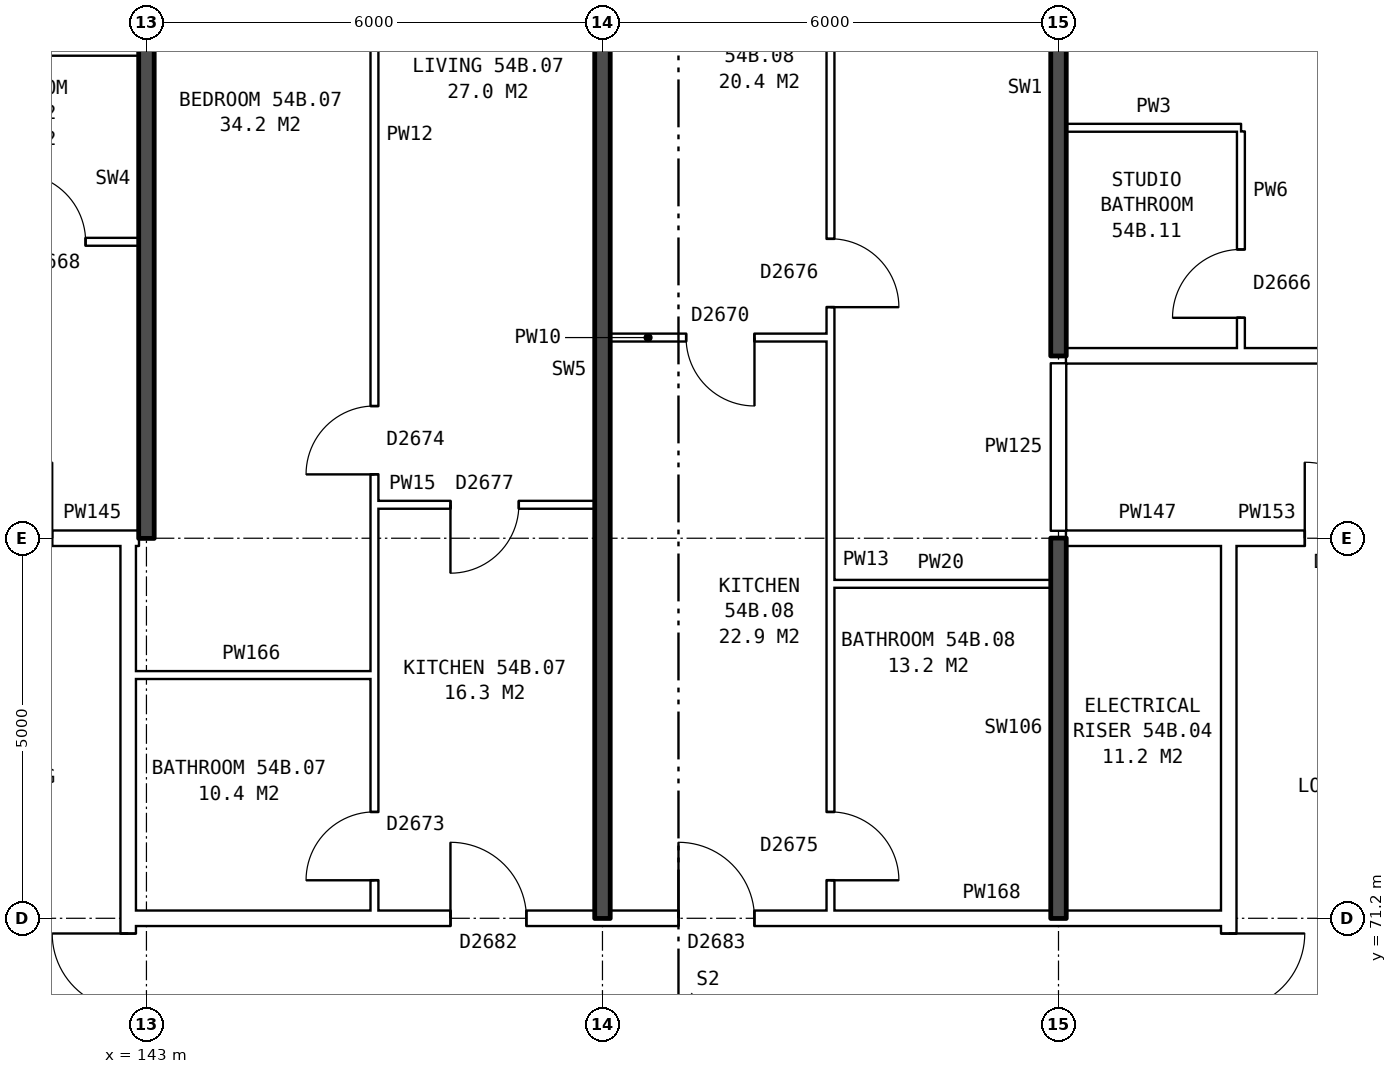
"""IFC4 building model, lengths in metres.
Left out: names, types, materials, properties, quantities, classifications, styles, units other than length and angle.
Written with IfcOpenShell. Run it as: python <this file> out.ifc"""

import sys

from ifc_helpers import new_model, si_unit, direction, frame, frame_2d, origin, place, context, subcontext, project, spatial, rectangle, extrude, element, fill, save


model = new_model("IFC4")
c1 = context("Model", 3, precision=1e-05, world=origin(), true_north=direction((0.0, 1.0)))
c2 = subcontext(c1, "Body", "Model", "MODEL_VIEW")
j1 = project(units=[si_unit("LENGTHUNIT", "METRE"), si_unit("PLANEANGLEUNIT", "RADIAN")], contexts=[c1])
p1 = place(None, origin())
s1 = spatial("IfcSite", under=j1, at=p1, CompositionType="ELEMENT")
p2 = place(p1, origin())
s2 = spatial("IfcBuilding", under=s1, at=p2, CompositionType="ELEMENT")
p3 = place(p2, frame((0.0, 0.0, 191.3)))
s3 = spatial("IfcBuildingStorey", under=s2, at=p3, CompositionType="ELEMENT", Elevation=191.3)
p4 = place(p3, frame((142.76, 63.9, 0.0), z_axis=(0.0, 0.0, 1.0), x_axis=(0.0, 1.0, 0.0)))
e1 = element("IfcWall", 1, at=p4, inside=s3, PredefinedType="PARTITIONING", context=c2, shape_type="SweptSolid", body=[
    extrude(rectangle(XDim=12.2, YDim=0.2, at=frame_2d((6.1, 0.0))), origin(), (0.0, 0.0, 1.0), 2.85),
])
p5 = place(p4, frame((5.1, 0.0, 0.0)))
e2 = element("IfcOpeningElement", 2, at=p5, cuts=e1, PredefinedType="OPENING", context=c2, shape_type="SweptSolid", body=[
    extrude(rectangle(XDim=2.0, YDim=2.1, at=frame_2d((1.0, 1.05))), frame((0.0, 0.11, 0.0), z_axis=(0.0, -1.0, 0.0), x_axis=(1.0, 0.0, 0.0)), (0.0, 0.0, 1.0), 0.22),
])
p6 = place(p3, frame((157.24, 63.9, 0.0), z_axis=(0.0, 0.0, 1.0), x_axis=(0.0, 1.0, 0.0)))
e3 = element("IfcWall", 3, at=p6, inside=s3, PredefinedType="PARTITIONING", context=c2, shape_type="SweptSolid", body=[
    extrude(rectangle(XDim=12.2, YDim=0.2, at=frame_2d((6.1, 0.0))), origin(), (0.0, 0.0, 1.0), 2.85),
])
p7 = place(p6, frame((5.1, 0.0, 0.0)))
e4 = element("IfcOpeningElement", 4, at=p7, cuts=e3, PredefinedType="OPENING", context=c2, shape_type="SweptSolid", body=[
    extrude(rectangle(XDim=2.0, YDim=2.1, at=frame_2d((1.0, 1.05))), frame((0.0, 0.11, 0.0), z_axis=(0.0, -1.0, 0.0), x_axis=(1.0, 0.0, 0.0)), (0.0, 0.0, 1.0), 0.22),
])
p8 = place(p3, frame((142.76, 71.2, 0.0), z_axis=(0.0, 0.0, 1.0), x_axis=(1.0, 0.0, 0.0)))
e5 = element("IfcWall", 5, at=p8, inside=s3, PredefinedType="PARTITIONING", context=c2, shape_type="SweptSolid", body=[
    extrude(rectangle(XDim=14.48, YDim=0.2, at=frame_2d((7.24, 0.0))), origin(), (0.0, 0.0, 1.0), 2.85),
])
p9 = place(p8, frame((4.24, 0.0, 0.0)))
e6 = element("IfcOpeningElement", 6, at=p9, cuts=e5, PredefinedType="OPENING", context=c2, shape_type="SweptSolid", body=[
    extrude(rectangle(XDim=1.0, YDim=2.1, at=frame_2d((0.5, 1.05))), frame((0.0, 0.11, 0.0), z_axis=(0.0, -1.0, 0.0), x_axis=(1.0, 0.0, 0.0)), (0.0, 0.0, 1.0), 0.22),
])
p10 = place(p8, frame((7.24, 0.0, 0.0)))
e7 = element("IfcOpeningElement", 7, at=p10, cuts=e5, PredefinedType="OPENING", context=c2, shape_type="SweptSolid", body=[
    extrude(rectangle(XDim=1.0, YDim=2.1, at=frame_2d((0.5, 1.05))), frame((0.0, 0.11, 0.0), z_axis=(0.0, -1.0, 0.0), x_axis=(1.0, 0.0, 0.0)), (0.0, 0.0, 1.0), 0.22),
])
p11 = place(p3, frame((142.76, 74.4, 0.0), z_axis=(0.0, 0.0, 1.0), x_axis=(1.0, 0.0, 0.0)))
e8 = element("IfcWall", 8, at=p11, inside=s3, PredefinedType="PARTITIONING", context=c2, shape_type="SweptSolid", body=[
    extrude(rectangle(XDim=3.24, YDim=0.1, at=frame_2d((1.62, 0.0))), origin(), (0.0, 0.0, 1.0), 2.85),
])
p12 = place(p3, frame((152.0, 75.6, 0.0), z_axis=(0.0, 0.0, 1.0), x_axis=(1.0, 0.0, 0.0)))
e9 = element("IfcWall", 9, at=p12, inside=s3, PredefinedType="PARTITIONING", context=c2, shape_type="SweptSolid", body=[
    extrude(rectangle(XDim=2.9, YDim=0.1, at=frame_2d((1.45, 0.0))), origin(), (0.0, 0.0, 1.0), 2.85),
])
p13 = place(p3, frame((139.76, 76.2, 0.0), z_axis=(0.0, 0.0, 1.0), x_axis=(1.0, 0.0, 0.0)))
e10 = element("IfcWall", 10, at=p13, inside=s3, PredefinedType="PARTITIONING", context=c2, shape_type="SweptSolid", body=[
    extrude(rectangle(XDim=3.0, YDim=0.2, at=frame_2d((1.5, 0.0))), origin(), (0.0, 0.0, 1.0), 2.85),
])
p14 = place(p13, frame((1.0, 0.0, 0.0)))
e11 = element("IfcOpeningElement", 11, at=p14, cuts=e10, PredefinedType="OPENING", context=c2, shape_type="SweptSolid", body=[
    extrude(rectangle(XDim=1.0, YDim=2.1, at=frame_2d((0.5, 1.05))), frame((0.0, 0.11, 0.0), z_axis=(0.0, -1.0, 0.0), x_axis=(1.0, 0.0, 0.0)), (0.0, 0.0, 1.0), 0.22),
])
p15 = place(p3, frame((142.76, 76.2, 0.0), z_axis=(0.0, 0.0, 1.0), x_axis=(1.0, 0.0, 0.0)))
e12 = element("IfcWall", 12, at=p15, inside=s3, PredefinedType="PARTITIONING", context=c2, shape_type="SweptSolid", body=[
    extrude(rectangle(XDim=0.14, YDim=0.2, at=frame_2d((0.07, 0.0))), origin(), (0.0, 0.0, 1.0), 2.85),
])
p16 = place(p3, frame((155.1, 76.2, 0.0), z_axis=(0.0, 0.0, 1.0), x_axis=(1.0, 0.0, 0.0)))
e13 = element("IfcWall", 13, at=p16, inside=s3, PredefinedType="PARTITIONING", context=c2, shape_type="SweptSolid", body=[
    extrude(rectangle(XDim=2.14, YDim=0.2, at=frame_2d((1.07, 0.0))), origin(), (0.0, 0.0, 1.0), 2.85),
])
p17 = place(p3, frame((157.24, 76.2, 0.0), z_axis=(0.0, 0.0, 1.0), x_axis=(1.0, 0.0, 0.0)))
e14 = element("IfcWall", 14, at=p17, inside=s3, PredefinedType="PARTITIONING", context=c2, shape_type="SweptSolid", body=[
    extrude(rectangle(XDim=3.0, YDim=0.2, at=frame_2d((1.5, 0.0))), origin(), (0.0, 0.0, 1.0), 2.85),
])
p18 = place(p17, frame((1.0, 0.0, 0.0)))
e15 = element("IfcOpeningElement", 15, at=p18, cuts=e14, PredefinedType="OPENING", context=c2, shape_type="SweptSolid", body=[
    extrude(rectangle(XDim=1.0, YDim=2.1, at=frame_2d((0.5, 1.05))), frame((0.0, 0.11, 0.0), z_axis=(0.0, -1.0, 0.0), x_axis=(1.0, 0.0, 0.0)), (0.0, 0.0, 1.0), 0.22),
])
p19 = place(p3, frame((146.0, 76.64, 0.0), z_axis=(0.0, 0.0, 1.0), x_axis=(1.0, 0.0, 0.0)))
e16 = element("IfcWall", 16, at=p19, inside=s3, PredefinedType="PARTITIONING", context=c2, shape_type="SweptSolid", body=[
    extrude(rectangle(XDim=2.9, YDim=0.1, at=frame_2d((1.45, 0.0))), origin(), (0.0, 0.0, 1.0), 2.85),
])
p20 = place(p19, frame((1.0, 0.0, 0.0)))
e17 = element("IfcOpeningElement", 17, at=p20, cuts=e16, PredefinedType="OPENING", context=c2, shape_type="SweptSolid", body=[
    extrude(rectangle(XDim=0.9, YDim=2.1, at=frame_2d((0.45, 1.05))), frame((0.0, 0.06, 0.0), z_axis=(0.0, -1.0, 0.0), x_axis=(1.0, 0.0, 0.0)), (0.0, 0.0, 1.0), 0.12),
])
p21 = place(p3, frame((155.1, 78.6, 0.0), z_axis=(0.0, 0.0, 1.0), x_axis=(1.0, 0.0, 0.0)))
e18 = element("IfcWall", 18, at=p21, inside=s3, PredefinedType="PARTITIONING", context=c2, shape_type="SweptSolid", body=[
    extrude(rectangle(XDim=14.79, YDim=0.2, at=frame_2d((7.395, 0.0))), origin(), (0.0, 0.0, 1.0), 2.85),
])
p22 = place(p21, frame((3.6, 0.0, 0.0)))
e19 = element("IfcOpeningElement", 19, at=p22, cuts=e18, PredefinedType="OPENING", context=c2, shape_type="SweptSolid", body=[
    extrude(rectangle(XDim=1.0, YDim=2.1, at=frame_2d((0.5, 1.05))), frame((0.0, 0.11, 0.0), z_axis=(0.0, -1.0, 0.0), x_axis=(1.0, 0.0, 0.0)), (0.0, 0.0, 1.0), 0.22),
])
p23 = place(p21, frame((7.2, 0.0, 0.0)))
e20 = element("IfcOpeningElement", 20, at=p23, cuts=e18, PredefinedType="OPENING", context=c2, shape_type="SweptSolid", body=[
    extrude(rectangle(XDim=1.0, YDim=2.1, at=frame_2d((0.5, 1.05))), frame((0.0, 0.11, 0.0), z_axis=(0.0, -1.0, 0.0), x_axis=(1.0, 0.0, 0.0)), (0.0, 0.0, 1.0), 0.22),
])
p24 = place(p3, frame((149.1, 78.84, 0.0), z_axis=(0.0, 0.0, 1.0), x_axis=(1.0, 0.0, 0.0)))
e21 = element("IfcWall", 21, at=p24, inside=s3, PredefinedType="PARTITIONING", context=c2, shape_type="SweptSolid", body=[
    extrude(rectangle(XDim=2.9, YDim=0.1, at=frame_2d((1.45, 0.0))), origin(), (0.0, 0.0, 1.0), 2.85),
])
p25 = place(p24, frame((1.0, 0.0, 0.0)))
e22 = element("IfcOpeningElement", 22, at=p25, cuts=e21, PredefinedType="OPENING", context=c2, shape_type="SweptSolid", body=[
    extrude(rectangle(XDim=0.9, YDim=2.1, at=frame_2d((0.45, 1.05))), frame((0.0, 0.06, 0.0), z_axis=(0.0, -1.0, 0.0), x_axis=(1.0, 0.0, 0.0)), (0.0, 0.0, 1.0), 0.12),
])
p26 = place(p3, frame((137.1, 80.1, 0.0), z_axis=(0.0, 0.0, 1.0), x_axis=(1.0, 0.0, 0.0)))
e23 = element("IfcWall", 23, at=p26, inside=s3, PredefinedType="PARTITIONING", context=c2, shape_type="SweptSolid", body=[
    extrude(rectangle(XDim=5.8, YDim=0.1, at=frame_2d((2.9, 0.0))), origin(), (0.0, 0.0, 1.0), 2.85),
])
p27 = place(p26, frame((1.3, 0.0, 0.0)))
e24 = element("IfcOpeningElement", 24, at=p27, cuts=e23, PredefinedType="OPENING", context=c2, shape_type="SweptSolid", body=[
    extrude(rectangle(XDim=0.9, YDim=2.1, at=frame_2d((0.45, 1.05))), frame((0.0, 0.06, 0.0), z_axis=(0.0, -1.0, 0.0), x_axis=(1.0, 0.0, 0.0)), (0.0, 0.0, 1.0), 0.12),
])
p28 = place(p26, frame((4.2, 0.0, 0.0)))
e25 = element("IfcOpeningElement", 25, at=p28, cuts=e23, PredefinedType="OPENING", context=c2, shape_type="SweptSolid", body=[
    extrude(rectangle(XDim=0.9, YDim=2.1, at=frame_2d((0.45, 1.05))), frame((0.0, 0.06, 0.0), z_axis=(0.0, -1.0, 0.0), x_axis=(1.0, 0.0, 0.0)), (0.0, 0.0, 1.0), 0.12),
])
for number, where, z_axis, x_axis in (
    (26, (155.1, 81.6, 0.0), (0.0, 0.0, 1.0), (1.0, 0.0, 0.0)),
    (27, (140.6, 82.6, 0.0), (0.0, 0.0, 1.0), (1.0, 0.0, 0.0)),
):
    element("IfcWall", number, at=place(p3, frame(where, z_axis=z_axis, x_axis=x_axis)), inside=s3, PredefinedType="PARTITIONING", context=c2, shape_type="SweptSolid", body=[
        extrude(rectangle(XDim=2.3, YDim=0.1, at=frame_2d((1.15, 0.0))), origin(), (0.0, 0.0, 1.0), 2.85),
    ])
p29 = place(p3, frame((143.0, 76.2, 0.0), z_axis=(0.0, 0.0, 1.0), x_axis=(0.0, 1.0, 0.0)))
e28 = element("IfcWall", 28, at=p29, inside=s3, PredefinedType="SOLIDWALL", context=c2, shape_type="SweptSolid", body=[
    extrude(rectangle(XDim=9.44, YDim=0.2, at=frame_2d((4.72, 0.0))), origin(), (0.0, 0.0, 1.0), 2.85),
])
p30 = place(p3, frame((146.0, 71.3, 0.0), z_axis=(0.0, 0.0, 1.0), x_axis=(0.0, 1.0, 0.0)))
e29 = element("IfcWall", 29, at=p30, inside=s3, PredefinedType="PARTITIONING", context=c2, shape_type="SweptSolid", body=[
    extrude(rectangle(XDim=14.34, YDim=0.1, at=frame_2d((7.17, 0.0))), origin(), (0.0, 0.0, 1.0), 2.85),
])
p31 = place(p30, frame((5.74, 0.0, 0.0)))
e30 = element("IfcOpeningElement", 30, at=p31, cuts=e29, PredefinedType="OPENING", context=c2, shape_type="SweptSolid", body=[
    extrude(rectangle(XDim=0.9, YDim=2.1, at=frame_2d((0.45, 1.05))), frame((0.0, 0.06, 0.0), z_axis=(0.0, -1.0, 0.0), x_axis=(1.0, 0.0, 0.0)), (0.0, 0.0, 1.0), 0.12),
])
p32 = place(p30, frame((0.4, 0.0, 0.0)))
e31 = element("IfcOpeningElement", 31, at=p32, cuts=e29, PredefinedType="OPENING", context=c2, shape_type="SweptSolid", body=[
    extrude(rectangle(XDim=0.9, YDim=2.1, at=frame_2d((0.45, 1.05))), frame((0.0, 0.06, 0.0), z_axis=(0.0, -1.0, 0.0), x_axis=(1.0, 0.0, 0.0)), (0.0, 0.0, 1.0), 0.12),
])
p33 = place(p3, frame((149.0, 71.2, 0.0), z_axis=(0.0, 0.0, 1.0), x_axis=(0.0, 1.0, 0.0)))
e32 = element("IfcWall", 32, at=p33, inside=s3, PredefinedType="SOLIDWALL", context=c2, shape_type="SweptSolid", body=[
    extrude(rectangle(XDim=14.44, YDim=0.2, at=frame_2d((7.22, 0.0))), origin(), (0.0, 0.0, 1.0), 2.85),
])
p34 = place(p3, frame((152.0, 71.3, 0.0), z_axis=(0.0, 0.0, 1.0), x_axis=(0.0, 1.0, 0.0)))
e33 = element("IfcWall", 33, at=p34, inside=s3, PredefinedType="PARTITIONING", context=c2, shape_type="SweptSolid", body=[
    extrude(rectangle(XDim=14.34, YDim=0.1, at=frame_2d((7.17, 0.0))), origin(), (0.0, 0.0, 1.0), 2.85),
])
p35 = place(p34, frame((7.94, 0.0, 0.0)))
e34 = element("IfcOpeningElement", 34, at=p35, cuts=e33, PredefinedType="OPENING", context=c2, shape_type="SweptSolid", body=[
    extrude(rectangle(XDim=0.9, YDim=2.1, at=frame_2d((0.45, 1.05))), frame((0.0, 0.06, 0.0), z_axis=(0.0, -1.0, 0.0), x_axis=(1.0, 0.0, 0.0)), (0.0, 0.0, 1.0), 0.12),
])
p36 = place(p34, frame((0.4, 0.0, 0.0)))
e35 = element("IfcOpeningElement", 35, at=p36, cuts=e33, PredefinedType="OPENING", context=c2, shape_type="SweptSolid", body=[
    extrude(rectangle(XDim=0.9, YDim=2.1, at=frame_2d((0.45, 1.05))), frame((0.0, 0.06, 0.0), z_axis=(0.0, -1.0, 0.0), x_axis=(1.0, 0.0, 0.0)), (0.0, 0.0, 1.0), 0.12),
])
p37 = place(p3, frame((155.0, 71.2, 0.0), z_axis=(0.0, 0.0, 1.0), x_axis=(0.0, 1.0, 0.0)))
e36 = element("IfcWall", 36, at=p37, inside=s3, PredefinedType="SOLIDWALL", context=c2, shape_type="SweptSolid", body=[
    extrude(rectangle(XDim=5.0, YDim=0.2, at=frame_2d((2.5, 0.0))), origin(), (0.0, 0.0, 1.0), 2.85),
])
p38 = place(p3, frame((155.0, 76.3, 0.0), z_axis=(0.0, 0.0, 1.0), x_axis=(0.0, 1.0, 0.0)))
e37 = element("IfcWall", 37, at=p38, inside=s3, PredefinedType="PARTITIONING", context=c2, shape_type="SweptSolid", body=[
    extrude(rectangle(XDim=2.2, YDim=0.2, at=frame_2d((1.1, 0.0))), origin(), (0.0, 0.0, 1.0), 2.85),
])
p39 = place(p3, frame((155.0, 78.6, 0.0), z_axis=(0.0, 0.0, 1.0), x_axis=(0.0, 1.0, 0.0)))
e38 = element("IfcWall", 38, at=p39, inside=s3, PredefinedType="SOLIDWALL", context=c2, shape_type="SweptSolid", body=[
    extrude(rectangle(XDim=7.04, YDim=0.2, at=frame_2d((3.52, 0.0))), origin(), (0.0, 0.0, 1.0), 2.85),
])
p40 = place(p3, frame((157.4, 78.7, 0.0), z_axis=(0.0, 0.0, 1.0), x_axis=(0.0, 1.0, 0.0)))
e39 = element("IfcWall", 39, at=p40, inside=s3, PredefinedType="PARTITIONING", context=c2, shape_type="SweptSolid", body=[
    extrude(rectangle(XDim=2.85, YDim=0.1, at=frame_2d((1.425, 0.0))), origin(), (0.0, 0.0, 1.0), 2.85),
])
p41 = place(p40, frame((0.4, 0.0, 0.0)))
e40 = element("IfcOpeningElement", 40, at=p41, cuts=e39, PredefinedType="OPENING", context=c2, shape_type="SweptSolid", body=[
    extrude(rectangle(XDim=0.9, YDim=2.1, at=frame_2d((0.45, 1.05))), frame((0.0, 0.06, 0.0), z_axis=(0.0, -1.0, 0.0), x_axis=(1.0, 0.0, 0.0)), (0.0, 0.0, 1.0), 0.12),
])
p42 = place(p5, origin())
e41 = element("IfcDoor", 41, at=p42, inside=s3, OperationType="DOUBLE_DOOR_SINGLE_SWING", PredefinedType="DOOR", context=c2, shape_type="SweptSolid", body=[
    extrude(rectangle(XDim=2.0, YDim=2.1, at=frame_2d((1.0, 1.05))), frame((0.0, 0.025, 0.0), z_axis=(0.0, -1.0, 0.0), x_axis=(1.0, 0.0, 0.0)), (0.0, 0.0, 1.0), 0.05),
])
fill(e2, e41)
p43 = place(p7, frame((2.0, 0.0, 0.0), z_axis=(0.0, 0.0, 1.0), x_axis=(-1.0, 0.0, 0.0)))
e42 = element("IfcDoor", 42, at=p43, inside=s3, OperationType="DOUBLE_DOOR_SINGLE_SWING", PredefinedType="DOOR", context=c2, shape_type="SweptSolid", body=[
    extrude(rectangle(XDim=2.0, YDim=2.1, at=frame_2d((1.0, 1.05))), frame((0.0, 0.025, 0.0), z_axis=(0.0, -1.0, 0.0), x_axis=(1.0, 0.0, 0.0)), (0.0, 0.0, 1.0), 0.05),
])
fill(e4, e42)
p44 = place(p18, origin())
e43 = element("IfcDoor", 43, at=p44, inside=s3, OperationType="SINGLE_SWING_LEFT", PredefinedType="DOOR", context=c2, shape_type="SweptSolid", body=[
    extrude(rectangle(XDim=1.0, YDim=2.1, at=frame_2d((0.5, 1.05))), frame((0.0, 0.025, 0.0), z_axis=(0.0, -1.0, 0.0), x_axis=(1.0, 0.0, 0.0)), (0.0, 0.0, 1.0), 0.05),
])
fill(e15, e43)
p45 = place(p28, origin())
e44 = element("IfcDoor", 44, at=p45, inside=s3, OperationType="SINGLE_SWING_LEFT", PredefinedType="DOOR", context=c2, shape_type="SweptSolid", body=[
    extrude(rectangle(XDim=0.9, YDim=2.1, at=frame_2d((0.45, 1.05))), frame((0.0, 0.025, 0.0), z_axis=(0.0, -1.0, 0.0), x_axis=(1.0, 0.0, 0.0)), (0.0, 0.0, 1.0), 0.05),
])
fill(e25, e44)
p46 = place(p31, origin())
e45 = element("IfcDoor", 45, at=p46, inside=s3, OperationType="SINGLE_SWING_LEFT", PredefinedType="DOOR", context=c2, shape_type="SweptSolid", body=[
    extrude(rectangle(XDim=0.9, YDim=2.1, at=frame_2d((0.45, 1.05))), frame((0.0, 0.025, 0.0), z_axis=(0.0, -1.0, 0.0), x_axis=(1.0, 0.0, 0.0)), (0.0, 0.0, 1.0), 0.05),
])
fill(e30, e45)
p47 = place(p9, origin())
e46 = element("IfcDoor", 46, at=p47, inside=s3, OperationType="SINGLE_SWING_LEFT", PredefinedType="DOOR", context=c2, shape_type="SweptSolid", body=[
    extrude(rectangle(XDim=1.0, YDim=2.1, at=frame_2d((0.5, 1.05))), frame((0.0, 0.025, 0.0), z_axis=(0.0, -1.0, 0.0), x_axis=(1.0, 0.0, 0.0)), (0.0, 0.0, 1.0), 0.05),
])
fill(e6, e46)
p48 = place(p20, frame((0.9, 0.0, 0.0), z_axis=(0.0, 0.0, 1.0), x_axis=(-1.0, 0.0, 0.0)))
e47 = element("IfcDoor", 47, at=p48, inside=s3, OperationType="SINGLE_SWING_RIGHT", PredefinedType="DOOR", context=c2, shape_type="SweptSolid", body=[
    extrude(rectangle(XDim=0.9, YDim=2.1, at=frame_2d((0.45, 1.05))), frame((0.0, 0.025, 0.0), z_axis=(0.0, -1.0, 0.0), x_axis=(1.0, 0.0, 0.0)), (0.0, 0.0, 1.0), 0.05),
])
fill(e17, e47)
p49 = place(p32, origin())
e48 = element("IfcDoor", 48, at=p49, inside=s3, OperationType="SINGLE_SWING_LEFT", PredefinedType="DOOR", context=c2, shape_type="SweptSolid", body=[
    extrude(rectangle(XDim=0.9, YDim=2.1, at=frame_2d((0.45, 1.05))), frame((0.0, 0.025, 0.0), z_axis=(0.0, -1.0, 0.0), x_axis=(1.0, 0.0, 0.0)), (0.0, 0.0, 1.0), 0.05),
])
fill(e31, e48)
p50 = place(p35, frame((0.9, 0.0, 0.0), z_axis=(0.0, 0.0, 1.0), x_axis=(-1.0, 0.0, 0.0)))
e49 = element("IfcDoor", 49, at=p50, inside=s3, OperationType="SINGLE_SWING_RIGHT", PredefinedType="DOOR", context=c2, shape_type="SweptSolid", body=[
    extrude(rectangle(XDim=0.9, YDim=2.1, at=frame_2d((0.45, 1.05))), frame((0.0, 0.025, 0.0), z_axis=(0.0, -1.0, 0.0), x_axis=(1.0, 0.0, 0.0)), (0.0, 0.0, 1.0), 0.05),
])
fill(e34, e49)
p51 = place(p10, origin())
e50 = element("IfcDoor", 50, at=p51, inside=s3, OperationType="SINGLE_SWING_LEFT", PredefinedType="DOOR", context=c2, shape_type="SweptSolid", body=[
    extrude(rectangle(XDim=1.0, YDim=2.1, at=frame_2d((0.5, 1.05))), frame((0.0, 0.025, 0.0), z_axis=(0.0, -1.0, 0.0), x_axis=(1.0, 0.0, 0.0)), (0.0, 0.0, 1.0), 0.05),
])
fill(e7, e50)
p52 = place(p25, frame((0.9, 0.0, 0.0), z_axis=(0.0, 0.0, 1.0), x_axis=(-1.0, 0.0, 0.0)))
e51 = element("IfcDoor", 51, at=p52, inside=s3, OperationType="SINGLE_SWING_LEFT", PredefinedType="DOOR", context=c2, shape_type="SweptSolid", body=[
    extrude(rectangle(XDim=0.9, YDim=2.1, at=frame_2d((0.45, 1.05))), frame((0.0, 0.025, 0.0), z_axis=(0.0, -1.0, 0.0), x_axis=(1.0, 0.0, 0.0)), (0.0, 0.0, 1.0), 0.05),
])
fill(e22, e51)
p53 = place(p36, frame((0.9, 0.0, 0.0), z_axis=(0.0, 0.0, 1.0), x_axis=(-1.0, 0.0, 0.0)))
e52 = element("IfcDoor", 52, at=p53, inside=s3, OperationType="SINGLE_SWING_RIGHT", PredefinedType="DOOR", context=c2, shape_type="SweptSolid", body=[
    extrude(rectangle(XDim=0.9, YDim=2.1, at=frame_2d((0.45, 1.05))), frame((0.0, 0.025, 0.0), z_axis=(0.0, -1.0, 0.0), x_axis=(1.0, 0.0, 0.0)), (0.0, 0.0, 1.0), 0.05),
])
fill(e35, e52)
p54 = place(p41, origin())
e53 = element("IfcDoor", 53, at=p54, inside=s3, OperationType="SINGLE_SWING_LEFT", PredefinedType="DOOR", context=c2, shape_type="SweptSolid", body=[
    extrude(rectangle(XDim=0.9, YDim=2.1, at=frame_2d((0.45, 1.05))), frame((0.0, 0.025, 0.0), z_axis=(0.0, -1.0, 0.0), x_axis=(1.0, 0.0, 0.0)), (0.0, 0.0, 1.0), 0.05),
])
fill(e40, e53)
save(model, sys.argv[1])
